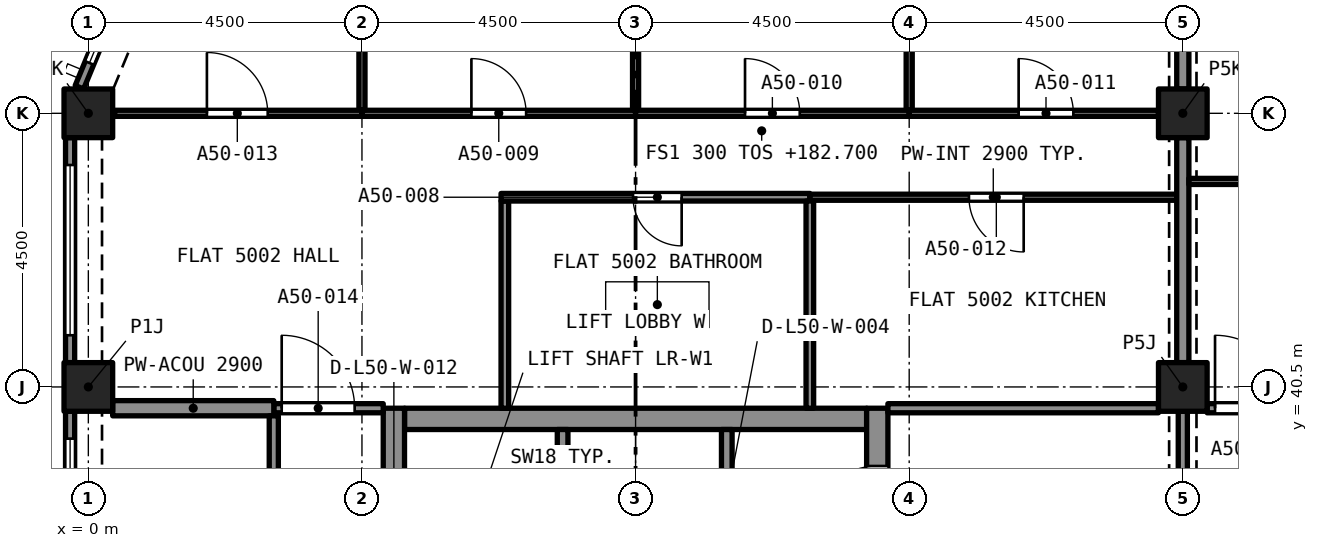
"""IFC4 building model, lengths in metres.
Left out: names, types, materials, properties, quantities, classifications, styles, units other than length and angle.
Written with IfcOpenShell. Run it as: python <this file> out.ifc"""

import sys

from ifc_helpers import new_model, si_unit, direction, frame, frame_2d, origin, origin_2d, place, context, subcontext, project, spatial, rectangle, extrude, element, fill, save


model = new_model("IFC4")
c1 = context("Model", 3, precision=1e-05, world=origin(), true_north=direction((0.0, 1.0)))
c2 = subcontext(c1, "Body", "Model", "MODEL_VIEW")
j1 = project(units=[si_unit("LENGTHUNIT", "METRE"), si_unit("PLANEANGLEUNIT", "RADIAN")], contexts=[c1])
p1 = place(None, origin())
s1 = spatial("IfcSite", under=j1, at=p1, CompositionType="ELEMENT")
p2 = place(p1, origin())
s2 = spatial("IfcBuilding", under=s1, at=p2, CompositionType="ELEMENT")
p3 = place(p2, frame((0.0, 0.0, 182.7)))
s3 = spatial("IfcBuildingStorey", under=s2, at=p3, CompositionType="ELEMENT", Elevation=182.7)
for number, where, z_axis, x_axis in (
    (1, (0.0, 40.5, 0.0), (0.0, 0.0, 1.0), (1.0, 0.0, 0.0)),
    (2, (18.0, 40.5, 0.0), (0.0, 0.0, 1.0), (1.0, 0.0, 0.0)),
    (3, (0.0, 45.0, 0.0), (0.0, 0.0, 1.0), (1.0, 0.0, 0.0)),
    (4, (18.0, 45.0, 0.0), (0.0, 0.0, 1.0), (1.0, 0.0, 0.0)),
):
    element("IfcColumn", number, at=place(p3, frame(where, z_axis=z_axis, x_axis=x_axis)), inside=s3, PredefinedType="COLUMN", context=c2, shape_type="SweptSolid", body=[
        extrude(rectangle(XDim=0.8, YDim=0.8, at=origin_2d()), origin(), (0.0, 0.0, 1.0), 3.2),
    ])
p4 = place(p3, frame((5.2, 39.975, 0.0), z_axis=(0.0, 0.0, 1.0), x_axis=(1.0, 0.0, 0.0)))
e5 = element("IfcWall", 5, at=p4, inside=s3, PredefinedType="SOLIDWALL", context=c2, shape_type="SweptSolid", body=[
    extrude(rectangle(XDim=7.6, YDim=0.35, at=frame_2d((3.8, 0.0))), origin(), (0.0, 0.0, 1.0), 3.2),
])
p5 = place(p3, frame((5.025, 27.35, 0.0), z_axis=(0.0, 0.0, 1.0), x_axis=(0.0, 1.0, 0.0)))
e6 = element("IfcWall", 6, at=p5, inside=s3, PredefinedType="SOLIDWALL", context=c2, shape_type="SweptSolid", body=[
    extrude(rectangle(XDim=12.8, YDim=0.35, at=frame_2d((6.4, 0.0))), origin(), (0.0, 0.0, 1.0), 3.2),
])
p6 = place(p5, frame((8.6, 0.0, 0.0)))
e7 = element("IfcOpeningElement", 7, at=p6, cuts=e6, PredefinedType="OPENING", context=c2, shape_type="SweptSolid", body=[
    extrude(rectangle(XDim=1.2, YDim=2.1, at=frame_2d((0.6, 1.05))), frame((0.0, 0.185, 0.0), z_axis=(0.0, -1.0, 0.0), x_axis=(1.0, 0.0, 0.0)), (0.0, 0.0, 1.0), 0.37),
])
p7 = place(p3, frame((12.975, 27.35, 0.0), z_axis=(0.0, 0.0, 1.0), x_axis=(0.0, 1.0, 0.0)))
e8 = element("IfcWall", 8, at=p7, inside=s3, PredefinedType="SOLIDWALL", context=c2, shape_type="SweptSolid", body=[
    extrude(rectangle(XDim=12.8, YDim=0.35, at=frame_2d((6.4, 0.0))), origin(), (0.0, 0.0, 1.0), 3.2),
])
p8 = place(p7, frame((10.75, 0.0, 0.0)))
e9 = element("IfcOpeningElement", 9, at=p8, cuts=e8, PredefinedType="OPENING", context=c2, shape_type="SweptSolid", body=[
    extrude(rectangle(XDim=1.1, YDim=2.1, at=frame_2d((0.55, 1.05))), frame((0.0, 0.185, 0.0), z_axis=(0.0, -1.0, 0.0), x_axis=(1.0, 0.0, 0.0)), (0.0, 0.0, 1.0), 0.37),
])
p9 = place(p7, frame((8.6, 0.0, 0.0)))
e10 = element("IfcOpeningElement", 10, at=p9, cuts=e8, PredefinedType="OPENING", context=c2, shape_type="SweptSolid", body=[
    extrude(rectangle(XDim=1.2, YDim=2.1, at=frame_2d((0.6, 1.05))), frame((0.0, 0.185, 0.0), z_axis=(0.0, -1.0, 0.0), x_axis=(1.0, 0.0, 0.0)), (0.0, 0.0, 1.0), 0.37),
])
p10 = place(p3, frame((-0.147, 45.429, 0.0), z_axis=(0.0, 0.0, 1.0), x_axis=(0.382669406082, 0.923885342263, 0.0)))
e11 = element("IfcWall", 11, at=p10, inside=s3, PredefinedType="SOLIDWALL", context=c2, shape_type="SweptSolid", body=[
    extrude(rectangle(XDim=2.602, YDim=0.15, at=frame_2d((1.301, 0.0))), origin(), (0.0, 0.0, 1.0), 3.2),
])
p11 = place(p10, frame((0.432, 0.0, 0.45)))
e12 = element("IfcOpeningElement", 12, at=p11, cuts=e11, PredefinedType="OPENING", context=c2, shape_type="SweptSolid", body=[
    extrude(rectangle(XDim=1.9, YDim=1.95, at=frame_2d((0.95, 0.975))), frame((0.0, 0.085, 0.0), z_axis=(0.0, -1.0, 0.0), x_axis=(1.0, 0.0, 0.0)), (0.0, 0.0, 1.0), 0.17),
])
p12 = place(p3, frame((-0.3, 40.9, 0.0), z_axis=(0.0, 0.0, 1.0), x_axis=(0.0, 1.0, 0.0)))
e13 = element("IfcWall", 13, at=p12, inside=s3, PredefinedType="SOLIDWALL", context=c2, shape_type="SweptSolid", body=[
    extrude(rectangle(XDim=3.7, YDim=0.15, at=frame_2d((1.85, 0.0))), origin(), (0.0, 0.0, 1.0), 3.2),
])
p13 = place(p12, frame((0.45, 0.0, 0.45)))
e14 = element("IfcOpeningElement", 14, at=p13, cuts=e13, PredefinedType="OPENING", context=c2, shape_type="SweptSolid", body=[
    extrude(rectangle(XDim=2.8, YDim=1.95, at=frame_2d((1.4, 0.975))), frame((0.0, 0.085, 0.0), z_axis=(0.0, -1.0, 0.0), x_axis=(1.0, 0.0, 0.0)), (0.0, 0.0, 1.0), 0.17),
])
p14 = place(p3, frame((-0.3, 36.4, 0.0), z_axis=(0.0, 0.0, 1.0), x_axis=(0.0, 1.0, 0.0)))
e15 = element("IfcWall", 15, at=p14, inside=s3, PredefinedType="SOLIDWALL", context=c2, shape_type="SweptSolid", body=[
    extrude(rectangle(XDim=3.7, YDim=0.15, at=frame_2d((1.85, 0.0))), origin(), (0.0, 0.0, 1.0), 3.2),
])
p15 = place(p14, frame((0.45, 0.0, 0.45)))
e16 = element("IfcOpeningElement", 16, at=p15, cuts=e15, PredefinedType="OPENING", context=c2, shape_type="SweptSolid", body=[
    extrude(rectangle(XDim=2.8, YDim=1.95, at=frame_2d((1.4, 0.975))), frame((0.0, 0.085, 0.0), z_axis=(0.0, -1.0, 0.0), x_axis=(1.0, 0.0, 0.0)), (0.0, 0.0, 1.0), 0.17),
])
p16 = place(p3, frame((6.85, 40.15, 0.0), z_axis=(0.0, 0.0, 1.0), x_axis=(0.0, 1.0, 0.0)))
e17 = element("IfcWall", 17, at=p16, inside=s3, PredefinedType="PARTITIONING", context=c2, shape_type="SweptSolid", body=[
    extrude(rectangle(XDim=3.408, YDim=0.125, at=frame_2d((1.704, 0.0))), origin(), (0.0, 0.0, 1.0), 2.9),
])
p17 = place(p3, frame((11.866, 43.62, 0.0), z_axis=(0.0, 0.0, 1.0), x_axis=(-1.0, 0.0, 0.0)))
e18 = element("IfcWall", 18, at=p17, inside=s3, PredefinedType="PARTITIONING", context=c2, shape_type="SweptSolid", body=[
    extrude(rectangle(XDim=5.078, YDim=0.125, at=frame_2d((2.539, 0.0))), origin(), (0.0, 0.0, 1.0), 2.9),
])
p18 = place(p17, frame((2.108, 0.0, 0.0)))
e19 = element("IfcOpeningElement", 19, at=p18, cuts=e18, PredefinedType="OPENING", context=c2, shape_type="SweptSolid", body=[
    extrude(rectangle(XDim=0.8, YDim=2.1, at=frame_2d((0.4, 1.05))), frame((0.0, 0.073, 0.0), z_axis=(0.0, -1.0, 0.0), x_axis=(1.0, 0.0, 0.0)), (0.0, 0.0, 1.0), 0.145),
])
p19 = place(p3, frame((11.866, 40.15, 0.0), z_axis=(0.0, 0.0, 1.0), x_axis=(0.0, 1.0, 0.0)))
e20 = element("IfcWall", 20, at=p19, inside=s3, PredefinedType="PARTITIONING", context=c2, shape_type="SweptSolid", body=[
    extrude(rectangle(XDim=3.408, YDim=0.125, at=frame_2d((1.704, 0.0))), origin(), (0.0, 0.0, 1.0), 2.9),
])
p20 = place(p3, frame((9.0, 45.05, 0.0), z_axis=(0.0, 0.0, 1.0), x_axis=(0.0, 1.0, 0.0)))
e21 = element("IfcWall", 21, at=p20, inside=s3, PredefinedType="PARTITIONING", context=c2, shape_type="SweptSolid", body=[
    extrude(rectangle(XDim=4.05, YDim=0.1, at=frame_2d((2.025, 0.0))), origin(), (0.0, 0.0, 1.0), 2.9),
])
p21 = place(p3, frame((4.5, 45.0, 0.0), z_axis=(0.0, 0.0, 1.0), x_axis=(1.0, 0.0, 0.0)))
e22 = element("IfcWall", 22, at=p21, inside=s3, PredefinedType="PARTITIONING", context=c2, shape_type="SweptSolid", body=[
    extrude(rectangle(XDim=4.5, YDim=0.1, at=frame_2d((2.25, 0.0))), origin(), (0.0, 0.0, 1.0), 2.9),
])
p22 = place(p21, frame((1.8, 0.0, 0.0)))
e23 = element("IfcOpeningElement", 23, at=p22, cuts=e22, PredefinedType="OPENING", context=c2, shape_type="SweptSolid", body=[
    extrude(rectangle(XDim=0.9, YDim=2.1, at=frame_2d((0.45, 1.05))), frame((0.0, 0.06, 0.0), z_axis=(0.0, -1.0, 0.0), x_axis=(1.0, 0.0, 0.0)), (0.0, 0.0, 1.0), 0.12),
])
p23 = place(p3, frame((4.5, 45.05, 0.0), z_axis=(0.0, 0.0, 1.0), x_axis=(0.0, 1.0, 0.0)))
e24 = element("IfcWall", 24, at=p23, inside=s3, PredefinedType="PARTITIONING", context=c2, shape_type="SweptSolid", body=[
    extrude(rectangle(XDim=4.017, YDim=0.1, at=frame_2d((2.009, 0.0))), origin(), (0.0, 0.0, 1.0), 2.9),
])
p24 = place(p3, frame((13.5, 45.05, 0.0), z_axis=(0.0, 0.0, 1.0), x_axis=(0.0, 1.0, 0.0)))
e25 = element("IfcWall", 25, at=p24, inside=s3, PredefinedType="PARTITIONING", context=c2, shape_type="SweptSolid", body=[
    extrude(rectangle(XDim=4.05, YDim=0.1, at=frame_2d((2.025, 0.0))), origin(), (0.0, 0.0, 1.0), 2.9),
])
p25 = place(p3, frame((9.0, 45.0, 0.0), z_axis=(0.0, 0.0, 1.0), x_axis=(1.0, 0.0, 0.0)))
e26 = element("IfcWall", 26, at=p25, inside=s3, PredefinedType="PARTITIONING", context=c2, shape_type="SweptSolid", body=[
    extrude(rectangle(XDim=4.5, YDim=0.1, at=frame_2d((2.25, 0.0))), origin(), (0.0, 0.0, 1.0), 2.9),
])
p26 = place(p25, frame((1.8, 0.0, 0.0)))
e27 = element("IfcOpeningElement", 27, at=p26, cuts=e26, PredefinedType="OPENING", context=c2, shape_type="SweptSolid", body=[
    extrude(rectangle(XDim=0.9, YDim=2.1, at=frame_2d((0.45, 1.05))), frame((0.0, 0.06, 0.0), z_axis=(0.0, -1.0, 0.0), x_axis=(1.0, 0.0, 0.0)), (0.0, 0.0, 1.0), 0.12),
])
p27 = place(p3, frame((13.5, 45.0, 0.0), z_axis=(0.0, 0.0, 1.0), x_axis=(1.0, 0.0, 0.0)))
e28 = element("IfcWall", 28, at=p27, inside=s3, PredefinedType="PARTITIONING", context=c2, shape_type="SweptSolid", body=[
    extrude(rectangle(XDim=4.1, YDim=0.1, at=frame_2d((2.05, 0.0))), origin(), (0.0, 0.0, 1.0), 2.9),
])
p28 = place(p27, frame((1.8, 0.0, 0.0)))
e29 = element("IfcOpeningElement", 29, at=p28, cuts=e28, PredefinedType="OPENING", context=c2, shape_type="SweptSolid", body=[
    extrude(rectangle(XDim=0.9, YDim=2.1, at=frame_2d((0.45, 1.05))), frame((0.0, 0.06, 0.0), z_axis=(0.0, -1.0, 0.0), x_axis=(1.0, 0.0, 0.0)), (0.0, 0.0, 1.0), 0.12),
])
p29 = place(p3, frame((18.0, 45.4, 0.0), z_axis=(0.0, 0.0, 1.0), x_axis=(0.0, 1.0, 0.0)))
e30 = element("IfcWall", 30, at=p29, inside=s3, PredefinedType="PARTITIONING", context=c2, shape_type="SweptSolid", body=[
    extrude(rectangle(XDim=3.7, YDim=0.2, at=frame_2d((1.85, 0.0))), origin(), (0.0, 0.0, 1.0), 2.38),
])
p30 = place(p3, frame((17.9, 43.62, 0.0), z_axis=(0.0, 0.0, 1.0), x_axis=(-1.0, 0.0, 0.0)))
e31 = element("IfcWall", 31, at=p30, inside=s3, PredefinedType="PARTITIONING", context=c2, shape_type="SweptSolid", body=[
    extrude(rectangle(XDim=6.034, YDim=0.1, at=frame_2d((3.017, 0.0))), origin(), (0.0, 0.0, 1.0), 2.9),
])
p31 = place(p30, frame((2.517, 0.0, 0.0)))
e32 = element("IfcOpeningElement", 32, at=p31, cuts=e31, PredefinedType="OPENING", context=c2, shape_type="SweptSolid", body=[
    extrude(rectangle(XDim=0.9, YDim=2.1, at=frame_2d((0.45, 1.05))), frame((0.0, 0.06, 0.0), z_axis=(0.0, -1.0, 0.0), x_axis=(1.0, 0.0, 0.0)), (0.0, 0.0, 1.0), 0.12),
])
p32 = place(p3, frame((0.433, 45.0, 0.0), z_axis=(0.0, 0.0, 1.0), x_axis=(1.0, 0.0, 0.0)))
e33 = element("IfcWall", 33, at=p32, inside=s3, PredefinedType="PARTITIONING", context=c2, shape_type="SweptSolid", body=[
    extrude(rectangle(XDim=4.067, YDim=0.1, at=frame_2d((2.034, 0.0))), origin(), (0.0, 0.0, 1.0), 2.9),
])
p33 = place(p32, frame((1.517, 0.0, 0.0)))
e34 = element("IfcOpeningElement", 34, at=p33, cuts=e33, PredefinedType="OPENING", context=c2, shape_type="SweptSolid", body=[
    extrude(rectangle(XDim=1.0, YDim=2.1, at=frame_2d((0.5, 1.05))), frame((0.0, 0.06, 0.0), z_axis=(0.0, -1.0, 0.0), x_axis=(1.0, 0.0, 0.0)), (0.0, 0.0, 1.0), 0.12),
])
p34 = place(p3, frame((3.05, 40.15, 0.0), z_axis=(0.0, 0.0, 1.0), x_axis=(1.0, 0.0, 0.0)))
e35 = element("IfcWall", 35, at=p34, inside=s3, PredefinedType="PARTITIONING", context=c2, shape_type="SweptSolid", body=[
    extrude(rectangle(XDim=1.8, YDim=0.15, at=frame_2d((0.9, 0.0))), origin(), (0.0, 0.0, 1.0), 2.9),
])
p35 = place(p34, frame((0.13, 0.0, 0.0)))
e36 = element("IfcOpeningElement", 36, at=p35, cuts=e35, PredefinedType="OPENING", context=c2, shape_type="SweptSolid", body=[
    extrude(rectangle(XDim=1.2, YDim=2.4, at=frame_2d((0.6, 1.2))), frame((0.0, 0.085, 0.0), z_axis=(0.0, -1.0, 0.0), x_axis=(1.0, 0.0, 0.0)), (0.0, 0.0, 1.0), 0.17),
])
p36 = place(p3, frame((0.4, 40.15, 0.0), z_axis=(0.0, 0.0, 1.0), x_axis=(1.0, 0.0, 0.0)))
e37 = element("IfcWall", 37, at=p36, inside=s3, PredefinedType="PARTITIONING", context=c2, shape_type="SweptSolid", body=[
    extrude(rectangle(XDim=2.65, YDim=0.25, at=frame_2d((1.325, 0.0))), origin(), (0.0, 0.0, 1.0), 2.9),
])
p37 = place(p3, frame((18.0, 40.9, 0.0), z_axis=(0.0, 0.0, 1.0), x_axis=(0.0, 1.0, 0.0)))
e38 = element("IfcWall", 38, at=p37, inside=s3, PredefinedType="PARTITIONING", context=c2, shape_type="SweptSolid", body=[
    extrude(rectangle(XDim=3.7, YDim=0.2, at=frame_2d((1.85, 0.0))), origin(), (0.0, 0.0, 1.0), 2.38),
])
p38 = place(p3, frame((13.15, 40.15, 0.0), z_axis=(0.0, 0.0, 1.0), x_axis=(1.0, 0.0, 0.0)))
e39 = element("IfcWall", 39, at=p38, inside=s3, PredefinedType="PARTITIONING", context=c2, shape_type="SweptSolid", body=[
    extrude(rectangle(XDim=4.45, YDim=0.15, at=frame_2d((2.225, 0.0))), origin(), (0.0, 0.0, 1.0), 2.9),
])
p39 = place(p3, frame((18.1, 43.88, 0.0), z_axis=(0.0, 0.0, 1.0), x_axis=(1.0, 0.0, 0.0)))
e40 = element("IfcWall", 40, at=p39, inside=s3, PredefinedType="PARTITIONING", context=c2, shape_type="SweptSolid", body=[
    extrude(rectangle(XDim=4.4, YDim=0.1, at=frame_2d((2.2, 0.0))), origin(), (0.0, 0.0, 1.0), 2.75),
])
p40 = place(p39, frame((1.7, 0.0, 0.0)))
e41 = element("IfcOpeningElement", 41, at=p40, cuts=e40, PredefinedType="OPENING", context=c2, shape_type="SweptSolid", body=[
    extrude(rectangle(XDim=0.9, YDim=2.1, at=frame_2d((0.45, 1.05))), frame((0.0, 0.06, 0.0), z_axis=(0.0, -1.0, 0.0), x_axis=(1.0, 0.0, 0.0)), (0.0, 0.0, 1.0), 0.12),
])
p41 = place(p3, frame((18.4, 40.15, 0.0), z_axis=(0.0, 0.0, 1.0), x_axis=(1.0, 0.0, 0.0)))
e42 = element("IfcWall", 42, at=p41, inside=s3, PredefinedType="PARTITIONING", context=c2, shape_type="SweptSolid", body=[
    extrude(rectangle(XDim=1.95, YDim=0.15, at=frame_2d((0.975, 0.0))), origin(), (0.0, 0.0, 1.0), 2.75),
])
p42 = place(p41, frame((0.13, 0.0, 0.0)))
e43 = element("IfcOpeningElement", 43, at=p42, cuts=e42, PredefinedType="OPENING", context=c2, shape_type="SweptSolid", body=[
    extrude(rectangle(XDim=1.2, YDim=2.4, at=frame_2d((0.6, 1.2))), frame((0.0, 0.085, 0.0), z_axis=(0.0, -1.0, 0.0), x_axis=(1.0, 0.0, 0.0)), (0.0, 0.0, 1.0), 0.17),
])
p43 = place(p3, frame((18.0, 40.1, 0.0), z_axis=(0.0, 0.0, 1.0), x_axis=(0.0, -1.0, 0.0)))
e44 = element("IfcWall", 44, at=p43, inside=s3, PredefinedType="PARTITIONING", context=c2, shape_type="SweptSolid", body=[
    extrude(rectangle(XDim=3.7, YDim=0.15, at=frame_2d((1.85, 0.0))), origin(), (0.0, 0.0, 1.0), 2.38),
])
p44 = place(p43, frame((1.25, 0.0, 0.0)))
e45 = element("IfcOpeningElement", 45, at=p44, cuts=e44, PredefinedType="OPENING", context=c2, shape_type="SweptSolid", body=[
    extrude(rectangle(XDim=1.2, YDim=2.1, at=frame_2d((0.6, 1.05))), frame((0.0, 0.085, 0.0), z_axis=(0.0, -1.0, 0.0), x_axis=(1.0, 0.0, 0.0)), (0.0, 0.0, 1.0), 0.17),
])
p45 = place(p3, frame((3.05, 27.35, 0.0), z_axis=(0.0, 0.0, 1.0), x_axis=(0.0, 1.0, 0.0)))
e46 = element("IfcWall", 46, at=p45, inside=s3, PredefinedType="PARTITIONING", context=c2, shape_type="SweptSolid", body=[
    extrude(rectangle(XDim=12.675, YDim=0.15, at=frame_2d((6.337, 0.0))), origin(), (0.0, 0.0, 1.0), 2.9),
])
p46 = place(p45, frame((5.9, 0.0, 0.0)))
e47 = element("IfcOpeningElement", 47, at=p46, cuts=e46, PredefinedType="OPENING", context=c2, shape_type="SweptSolid", body=[
    extrude(rectangle(XDim=1.0, YDim=2.1, at=frame_2d((0.5, 1.05))), frame((0.0, 0.085, 0.0), z_axis=(0.0, -1.0, 0.0), x_axis=(1.0, 0.0, 0.0)), (0.0, 0.0, 1.0), 0.17),
])
p47 = place(p3, frame((7.8, 37.5, 0.0), z_axis=(0.0, 0.0, 1.0), x_axis=(0.0, 1.0, 0.0)))
e48 = element("IfcWall", 48, at=p47, inside=s3, PredefinedType="SOLIDWALL", context=c2, shape_type="SweptSolid", body=[
    extrude(rectangle(XDim=2.3, YDim=0.175, at=frame_2d((1.15, 0.0))), origin(), (0.0, 0.0, 1.0), 2.9),
])
p48 = place(p3, frame((10.5, 37.5, 0.0), z_axis=(0.0, 0.0, 1.0), x_axis=(0.0, 1.0, 0.0)))
e49 = element("IfcWall", 49, at=p48, inside=s3, PredefinedType="SOLIDWALL", context=c2, shape_type="SweptSolid", body=[
    extrude(rectangle(XDim=2.3, YDim=0.175, at=frame_2d((1.15, 0.0))), origin(), (0.0, 0.0, 1.0), 2.9),
])
p49 = place(p48, frame((0.65, 0.0, 0.0)))
e50 = element("IfcOpeningElement", 50, at=p49, cuts=e49, PredefinedType="OPENING", context=c2, shape_type="SweptSolid", body=[
    extrude(rectangle(XDim=1.0, YDim=2.1, at=frame_2d((0.5, 1.05))), frame((0.0, 0.097, 0.0), z_axis=(0.0, -1.0, 0.0), x_axis=(1.0, 0.0, 0.0)), (0.0, 0.0, 1.0), 0.195),
])
p50 = place(p11, origin())
e51 = element("IfcWindow", 51, at=p50, inside=s3, PartitioningType="SINGLE_PANEL", PredefinedType="WINDOW", context=c2, shape_type="SweptSolid", body=[
    extrude(rectangle(XDim=1.9, YDim=1.95, at=frame_2d((0.95, 0.975))), frame((0.0, 0.03, 0.0), z_axis=(0.0, -1.0, 0.0), x_axis=(1.0, 0.0, 0.0)), (0.0, 0.0, 1.0), 0.06),
])
fill(e12, e51)
p51 = place(p13, origin())
e52 = element("IfcWindow", 52, at=p51, inside=s3, PartitioningType="SINGLE_PANEL", PredefinedType="WINDOW", context=c2, shape_type="SweptSolid", body=[
    extrude(rectangle(XDim=2.8, YDim=1.95, at=frame_2d((1.4, 0.975))), frame((0.0, 0.03, 0.0), z_axis=(0.0, -1.0, 0.0), x_axis=(1.0, 0.0, 0.0)), (0.0, 0.0, 1.0), 0.06),
])
fill(e14, e52)
p52 = place(p15, origin())
e53 = element("IfcWindow", 53, at=p52, inside=s3, PartitioningType="SINGLE_PANEL", PredefinedType="WINDOW", context=c2, shape_type="SweptSolid", body=[
    extrude(rectangle(XDim=2.8, YDim=1.95, at=frame_2d((1.4, 0.975))), frame((0.0, 0.03, 0.0), z_axis=(0.0, -1.0, 0.0), x_axis=(1.0, 0.0, 0.0)), (0.0, 0.0, 1.0), 0.06),
])
fill(e16, e53)
p53 = place(p18, origin())
e54 = element("IfcDoor", 54, at=p53, inside=s3, OperationType="SINGLE_SWING_LEFT", PredefinedType="DOOR", context=c2, shape_type="SweptSolid", body=[
    extrude(rectangle(XDim=0.8, YDim=2.1, at=frame_2d((0.4, 1.05))), frame((0.0, 0.025, 0.0), z_axis=(0.0, -1.0, 0.0), x_axis=(1.0, 0.0, 0.0)), (0.0, 0.0, 1.0), 0.05),
])
fill(e19, e54)
p54 = place(p22, origin())
e55 = element("IfcDoor", 55, at=p54, inside=s3, OperationType="SINGLE_SWING_LEFT", PredefinedType="DOOR", context=c2, shape_type="SweptSolid", body=[
    extrude(rectangle(XDim=0.9, YDim=2.1, at=frame_2d((0.45, 1.05))), frame((0.0, 0.025, 0.0), z_axis=(0.0, -1.0, 0.0), x_axis=(1.0, 0.0, 0.0)), (0.0, 0.0, 1.0), 0.05),
])
fill(e23, e55)
p55 = place(p26, origin())
e56 = element("IfcDoor", 56, at=p55, inside=s3, OperationType="SINGLE_SWING_LEFT", PredefinedType="DOOR", context=c2, shape_type="SweptSolid", body=[
    extrude(rectangle(XDim=0.9, YDim=2.1, at=frame_2d((0.45, 1.05))), frame((0.0, 0.025, 0.0), z_axis=(0.0, -1.0, 0.0), x_axis=(1.0, 0.0, 0.0)), (0.0, 0.0, 1.0), 0.05),
])
fill(e27, e56)
p56 = place(p28, origin())
e57 = element("IfcDoor", 57, at=p56, inside=s3, OperationType="SINGLE_SWING_RIGHT", PredefinedType="DOOR", context=c2, shape_type="SweptSolid", body=[
    extrude(rectangle(XDim=0.9, YDim=2.1, at=frame_2d((0.45, 1.05))), frame((0.0, 0.025, 0.0), z_axis=(0.0, -1.0, 0.0), x_axis=(1.0, 0.0, 0.0)), (0.0, 0.0, 1.0), 0.05),
])
fill(e29, e57)
p57 = place(p31, origin())
e58 = element("IfcDoor", 58, at=p57, inside=s3, OperationType="SINGLE_SWING_LEFT", PredefinedType="DOOR", context=c2, shape_type="SweptSolid", body=[
    extrude(rectangle(XDim=0.9, YDim=2.1, at=frame_2d((0.45, 1.05))), frame((0.0, 0.025, 0.0), z_axis=(0.0, -1.0, 0.0), x_axis=(1.0, 0.0, 0.0)), (0.0, 0.0, 1.0), 0.05),
])
fill(e32, e58)
p58 = place(p33, origin())
e59 = element("IfcDoor", 59, at=p58, inside=s3, OperationType="SINGLE_SWING_LEFT", PredefinedType="DOOR", context=c2, shape_type="SweptSolid", body=[
    extrude(rectangle(XDim=1.0, YDim=2.1, at=frame_2d((0.5, 1.05))), frame((0.0, 0.025, 0.0), z_axis=(0.0, -1.0, 0.0), x_axis=(1.0, 0.0, 0.0)), (0.0, 0.0, 1.0), 0.05),
])
fill(e34, e59)
p59 = place(p35, origin())
e60 = element("IfcDoor", 60, at=p59, inside=s3, OperationType="SINGLE_SWING_LEFT", PredefinedType="DOOR", context=c2, shape_type="SweptSolid", body=[
    extrude(rectangle(XDim=1.2, YDim=2.4, at=frame_2d((0.6, 1.2))), frame((0.0, 0.025, 0.0), z_axis=(0.0, -1.0, 0.0), x_axis=(1.0, 0.0, 0.0)), (0.0, 0.0, 1.0), 0.05),
])
fill(e36, e60)
p60 = place(p42, origin())
e61 = element("IfcDoor", 61, at=p60, inside=s3, OperationType="SINGLE_SWING_LEFT", PredefinedType="DOOR", context=c2, shape_type="SweptSolid", body=[
    extrude(rectangle(XDim=1.2, YDim=2.4, at=frame_2d((0.6, 1.2))), frame((0.0, 0.025, 0.0), z_axis=(0.0, -1.0, 0.0), x_axis=(1.0, 0.0, 0.0)), (0.0, 0.0, 1.0), 0.05),
])
fill(e43, e61)
p61 = place(p8, origin())
e62 = element("IfcDoor", 62, at=p61, inside=s3, OperationType="SINGLE_SWING_LEFT", PredefinedType="DOOR", context=c2, shape_type="SweptSolid", body=[
    extrude(rectangle(XDim=1.1, YDim=2.1, at=frame_2d((0.55, 1.05))), frame((0.0, 0.025, 0.0), z_axis=(0.0, -1.0, 0.0), x_axis=(1.0, 0.0, 0.0)), (0.0, 0.0, 1.0), 0.05),
])
fill(e9, e62)
save(model, sys.argv[1])
